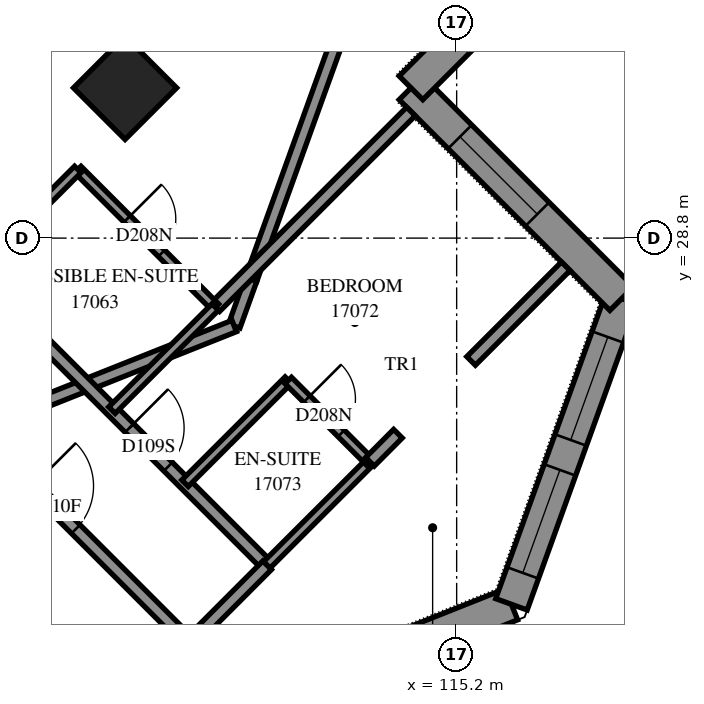
"""IFC4 building model, lengths in metres.
Left out: names, types, materials, properties, quantities, classifications, styles, units other than length and angle.
Written with IfcOpenShell. Run it as: python <this file> out.ifc"""

import sys

from ifc_helpers import new_model, si_unit, direction, frame, frame_2d, origin, origin_2d, place, context, subcontext, project, spatial, polyline, rectangle, outline, extrude, element, fill, save


model = new_model("IFC4")
c1 = context("Model", 3, precision=1e-05, world=origin(), true_north=direction((0.0, 1.0)))
c2 = subcontext(c1, "Body", "Model", "MODEL_VIEW")
j1 = project(units=[si_unit("LENGTHUNIT", "METRE"), si_unit("PLANEANGLEUNIT", "RADIAN")], contexts=[c1])
p1 = place(None, origin())
s1 = spatial("IfcSite", under=j1, at=p1, CompositionType="ELEMENT")
p2 = place(p1, origin())
s2 = spatial("IfcBuilding", under=s1, at=p2, CompositionType="ELEMENT")
p3 = place(p2, frame((0.0, 0.0, 64.4)))
s3 = spatial("IfcBuildingStorey", under=s2, at=p3, CompositionType="ELEMENT", Elevation=64.4)
p4 = place(p3, frame((109.747, 31.271, 0.0), z_axis=(0.0, 0.0, 1.0), x_axis=(0.7071067812, -0.7071067812, 0.0)))
e1 = element("IfcColumn", 1, at=p4, inside=s3, PredefinedType="COLUMN", context=c2, shape_type="SweptSolid", body=[
    extrude(rectangle(XDim=1.2, YDim=1.2, at=origin_2d()), origin(), (0.0, 0.0, 1.0), 3.1),
])
p5 = place(p3, frame((110.939, 20.724, 0.0), z_axis=(0.0, 0.0, 1.0), x_axis=(0.9291504333, 0.3697018694, 0.0)))
e2 = element("IfcWall", 2, at=p5, inside=s3, PredefinedType="SOLIDWALL", context=c2, shape_type="SweptSolid", body=[
    extrude(outline(polyline([(0.118, -0.275), (5.68, -0.275), (5.432, 0.275), (-0.118, 0.275), (0.118, -0.275)])), origin(), (0.0, 0.0, 1.0), 3.1),
])
p6 = place(p5, frame((1.749, 0.0, 0.7)))
e3 = element("IfcOpeningElement", 3, at=p6, cuts=e2, PredefinedType="OPENING", context=c2, shape_type="SweptSolid", body=[
    extrude(rectangle(XDim=1.8, YDim=2.0, at=frame_2d((0.9, 1.0))), frame((0.0, 0.285, 0.0), z_axis=(0.0, -1.0, 0.0), x_axis=(1.0, 0.0, 0.0)), (0.0, 0.0, 1.0), 0.57),
])
p7 = place(p3, frame((116.101, 22.778, 0.0), z_axis=(0.0, 0.0, 1.0), x_axis=(0.339264672, 0.9406909601, 0.0)))
e4 = element("IfcWall", 4, at=p7, inside=s3, PredefinedType="SOLIDWALL", context=c2, shape_type="SweptSolid", body=[
    extrude(outline(polyline([(-0.124, -0.275), (5.519, -0.275), (5.17, 0.275), (0.124, 0.275), (-0.124, -0.275)])), origin(), (0.0, 0.0, 1.0), 3.1),
])
p8 = place(p7, frame((0.549, 0.0, 0.7)))
e5 = element("IfcOpeningElement", 5, at=p8, cuts=e4, PredefinedType="OPENING", context=c2, shape_type="SweptSolid", body=[
    extrude(rectangle(XDim=1.8, YDim=2.0, at=frame_2d((0.9, 1.0))), frame((0.0, 0.285, 0.0), z_axis=(0.0, -1.0, 0.0), x_axis=(1.0, 0.0, 0.0)), (0.0, 0.0, 1.0), 0.57),
])
p9 = place(p7, frame((2.873, 0.0, 0.7)))
e6 = element("IfcOpeningElement", 6, at=p9, cuts=e4, PredefinedType="OPENING", context=c2, shape_type="SweptSolid", body=[
    extrude(rectangle(XDim=1.8, YDim=2.0, at=frame_2d((0.9, 1.0))), frame((0.0, 0.285, 0.0), z_axis=(0.0, -1.0, 0.0), x_axis=(1.0, 0.0, 0.0)), (0.0, 0.0, 1.0), 0.57),
])
p10 = place(p3, frame((117.914, 27.805, 0.0), z_axis=(0.0, 0.0, 1.0), x_axis=(-0.7071067812, 0.7071067812, 0.0)))
e7 = element("IfcWall", 7, at=p10, inside=s3, PredefinedType="SOLIDWALL", context=c2, shape_type="SweptSolid", body=[
    extrude(outline(polyline([(-0.175, -0.275), (4.625, -0.275), (5.175, 0.275), (0.175, 0.275), (-0.175, -0.275)])), origin(), (0.0, 0.0, 1.0), 3.1),
])
p11 = place(p10, frame((1.963, 0.0, 0.7)))
e8 = element("IfcOpeningElement", 8, at=p11, cuts=e7, PredefinedType="OPENING", context=c2, shape_type="SweptSolid", body=[
    extrude(rectangle(XDim=1.8, YDim=1.8, at=frame_2d((0.9, 0.9))), frame((0.0, 0.285, 0.0), z_axis=(0.0, -1.0, 0.0), x_axis=(1.0, 0.0, 0.0)), (0.0, 0.0, 1.0), 0.57),
])
p12 = place(p3, frame((114.449, 31.271, 0.0), z_axis=(0.0, 0.0, 1.0), x_axis=(0.7070983275, 0.7071152348, 0.0)))
e9 = element("IfcWall", 9, at=p12, inside=s3, PredefinedType="SOLIDWALL", context=c2, shape_type="SweptSolid", body=[
    extrude(outline(polyline([(0.275, -0.275), (6.305, -0.275), (5.524, 0.275), (-0.275, 0.275), (0.275, -0.275)])), origin(), (0.0, 0.0, 1.0), 3.1),
])
p13 = place(p12, frame((1.137, 0.0, 0.7)))
e10 = element("IfcOpeningElement", 10, at=p13, cuts=e9, PredefinedType="OPENING", context=c2, shape_type="SweptSolid", body=[
    extrude(rectangle(XDim=1.8, YDim=1.8, at=frame_2d((0.9, 0.9))), frame((0.0, 0.285, 0.0), z_axis=(0.0, -1.0, 0.0), x_axis=(1.0, 0.0, 0.0)), (0.0, 0.0, 1.0), 0.57),
])
p14 = place(p3, frame((113.239, 32.061, 0.0), z_axis=(0.0, 0.0, 1.0), x_axis=(-0.3392575143, -0.9406935415, 0.0)))
e11 = element("IfcWall", 11, at=p14, inside=s3, PredefinedType="PARAPET", context=c2, shape_type="SweptSolid", body=[
    extrude(outline(polyline([(0.0, -0.1), (4.185, -0.1), (4.185, 0.1), (0.0, 0.1), (0.0, -0.1)])), origin(), (0.0, 0.0, 1.0), 0.25),
])
p15 = place(p3, frame((111.819, 28.124, 0.0), z_axis=(0.0, 0.0, 1.0), x_axis=(-0.3392690321, -0.9406893876, 0.0)))
e12 = element("IfcWall", 12, at=p15, inside=s3, PredefinedType="PARAPET", context=c2, shape_type="SweptSolid", body=[
    extrude(outline(polyline([(0.0, -0.1), (0.773, -0.1), (0.863, 0.1), (0.0, 0.1), (0.0, -0.1)])), origin(), (0.0, 0.0, 1.0), 0.25),
])
p16 = place(p3, frame((111.542, 27.354, 0.0), z_axis=(0.0, 0.0, 1.0), x_axis=(-0.9291537819, -0.3696934536, 0.0)))
e13 = element("IfcWall", 13, at=p16, inside=s3, PredefinedType="PARAPET", context=c2, shape_type="SweptSolid", body=[
    extrude(outline(polyline([(0.045, -0.1), (5.612, -0.1), (5.526, 0.1), (-0.045, 0.1), (0.045, -0.1)])), origin(), (0.0, 0.0, 1.0), 0.25),
])
p17 = place(p3, frame((101.825, 31.125, 0.0), z_axis=(0.0, 0.0, 1.0), x_axis=(0.7071067812, -0.7071067812, 0.0)))
e14 = element("IfcWall", 14, at=p17, inside=s3, PredefinedType="PARTITIONING", context=c2, shape_type="SweptSolid", body=[
    extrude(rectangle(XDim=12.7, YDim=0.2, at=frame_2d((6.35, 0.0))), origin(), (0.0, 0.0, 1.0), 3.1),
])
p18 = place(p17, frame((3.895, 0.0, 0.0)))
e15 = element("IfcOpeningElement", 15, at=p18, cuts=e14, PredefinedType="OPENING", context=c2, shape_type="SweptSolid", body=[
    extrude(rectangle(XDim=0.9, YDim=2.1, at=frame_2d((0.45, 1.05))), frame((0.0, 0.11, 0.0), z_axis=(0.0, -1.0, 0.0), x_axis=(1.0, 0.0, 0.0)), (0.0, 0.0, 1.0), 0.22),
])
p19 = place(p17, frame((9.056, 0.0, 0.0)))
e16 = element("IfcOpeningElement", 16, at=p19, cuts=e14, PredefinedType="OPENING", context=c2, shape_type="SweptSolid", body=[
    extrude(rectangle(XDim=1.0, YDim=2.1, at=frame_2d((0.5, 1.05))), frame((0.0, 0.11, 0.0), z_axis=(0.0, -1.0, 0.0), x_axis=(1.0, 0.0, 0.0)), (0.0, 0.0, 1.0), 0.22),
])
p20 = place(p3, frame((106.987, 28.509, 0.0), z_axis=(0.0, 0.0, 1.0), x_axis=(0.7071067812, -0.7071067812, 0.0)))
e17 = element("IfcWall", 17, at=p20, inside=s3, PredefinedType="PARTITIONING", context=c2, shape_type="SweptSolid", body=[
    extrude(rectangle(XDim=7.198, YDim=0.2, at=frame_2d((3.599, 0.0))), origin(), (0.0, 0.0, 1.0), 3.1),
])
p21 = place(p20, frame((4.004, 0.0, 0.0)))
e18 = element("IfcOpeningElement", 18, at=p21, cuts=e17, PredefinedType="OPENING", context=c2, shape_type="SweptSolid", body=[
    extrude(rectangle(XDim=0.9, YDim=2.1, at=frame_2d((0.45, 1.05))), frame((0.0, 0.11, 0.0), z_axis=(0.0, -1.0, 0.0), x_axis=(1.0, 0.0, 0.0)), (0.0, 0.0, 1.0), 0.22),
])
p22 = place(p3, frame((111.231, 27.665, 0.0), z_axis=(0.0, 0.0, 1.0), x_axis=(0.7071067812, 0.7071067812, 0.0)))
e19 = element("IfcWall", 19, at=p22, inside=s3, PredefinedType="PARTITIONING", context=c2, shape_type="SweptSolid", body=[
    extrude(rectangle(XDim=4.55, YDim=0.2, at=frame_2d((2.275, 0.0))), origin(), (0.0, 0.0, 1.0), 3.1),
])
p23 = place(p3, frame((108.97, 29.928, 0.0), z_axis=(0.0, 0.0, 1.0), x_axis=(0.7067942478, -0.7074191764, 0.0)))
e20 = element("IfcWall", 20, at=p23, inside=s3, PredefinedType="PARTITIONING", context=c2, shape_type="SweptSolid", body=[
    extrude(rectangle(XDim=3.2, YDim=0.15, at=frame_2d((1.6, 0.0))), origin(), (0.0, 0.0, 1.0), 3.1),
])
p24 = place(p23, frame((1.148, 0.0, 0.0)))
e21 = element("IfcOpeningElement", 21, at=p24, cuts=e20, PredefinedType="OPENING", context=c2, shape_type="SweptSolid", body=[
    extrude(rectangle(XDim=0.8, YDim=2.1, at=frame_2d((0.4, 1.05))), frame((0.0, 0.085, 0.0), z_axis=(0.0, -1.0, 0.0), x_axis=(1.0, 0.0, 0.0)), (0.0, 0.0, 1.0), 0.17),
])
p25 = place(p3, frame((107.271, 28.231, 0.0), z_axis=(0.0, 0.0, 1.0), x_axis=(0.7071067812, 0.7071067812, 0.0)))
e22 = element("IfcWall", 22, at=p25, inside=s3, PredefinedType="PARTITIONING", context=c2, shape_type="SweptSolid", body=[
    extrude(rectangle(XDim=2.401, YDim=0.15, at=frame_2d((1.201, 0.0))), origin(), (0.0, 0.0, 1.0), 3.1),
])
for number, where, z_axis, x_axis in (
    (23, (112.077, 23.425, 0.0), (0.0, 0.0, 1.0), (0.708, 0.707, 0.0)),
    (24, (109.531, 25.971, 0.0), (0.0, 0.0, 1.0), (0.708, 0.707, 0.0)),
    (25, (110.734, 24.768, 0.0), (0.0, 0.0, 1.0), (0.708, 0.707, 0.0)),
):
    element("IfcWall", number, at=place(p3, frame(where, z_axis=z_axis, x_axis=x_axis)), inside=s3, PredefinedType="PARTITIONING", context=c2, shape_type="SweptSolid", body=[
        extrude(rectangle(XDim=2.4, YDim=0.15, at=frame_2d((1.2, 0.0))), origin(), (0.0, 0.0, 1.0), 3.1),
    ])
p26 = place(p3, frame((115.438, 26.78, 0.0), z_axis=(0.0, 0.0, 1.0), x_axis=(0.7071067812, 0.7071067812, 0.0)))
e26 = element("IfcWall", 26, at=p26, inside=s3, PredefinedType="PARTITIONING", context=c2, shape_type="SweptSolid", body=[
    extrude(rectangle(XDim=2.201, YDim=0.2, at=frame_2d((1.101, 0.0))), origin(), (0.0, 0.0, 1.0), 3.1),
])
p27 = place(p3, frame((112.431, 26.459, 0.0), z_axis=(0.0, 0.0, 1.0), x_axis=(0.7071067812, -0.7071067812, 0.0)))
e27 = element("IfcWall", 27, at=p27, inside=s3, PredefinedType="PARTITIONING", context=c2, shape_type="SweptSolid", body=[
    extrude(rectangle(XDim=1.901, YDim=0.15, at=frame_2d((0.95, 0.0))), origin(), (0.0, 0.0, 1.0), 3.1),
])
p28 = place(p27, frame((0.431, 0.0, 0.0)))
e28 = element("IfcOpeningElement", 28, at=p28, cuts=e27, PredefinedType="OPENING", context=c2, shape_type="SweptSolid", body=[
    extrude(rectangle(XDim=0.8, YDim=2.1, at=frame_2d((0.4, 1.05))), frame((0.0, 0.085, 0.0), z_axis=(0.0, -1.0, 0.0), x_axis=(1.0, 0.0, 0.0)), (0.0, 0.0, 1.0), 0.17),
])
p29 = place(p3, frame((110.811, 22.145, 0.0), z_axis=(0.0, 0.0, 1.0), x_axis=(0.7065510983, 0.7076620277, 0.0)))
e29 = element("IfcWall", 29, at=p29, inside=s3, PredefinedType="PARTITIONING", context=c2, shape_type="SweptSolid", body=[
    extrude(rectangle(XDim=1.8, YDim=0.2, at=frame_2d((0.9, 0.0))), origin(), (0.0, 0.0, 1.0), 3.1),
])
p30 = place(p3, frame((113.775, 25.122, 0.0), z_axis=(0.0, 0.0, 1.0), x_axis=(0.705571267, 0.7086389682, 0.0)))
e30 = element("IfcWall", 30, at=p30, inside=s3, PredefinedType="PARTITIONING", context=c2, shape_type="SweptSolid", body=[
    extrude(rectangle(XDim=0.652, YDim=0.2, at=frame_2d((0.326, 0.0))), origin(), (0.0, 0.0, 1.0), 3.1),
])
p31 = place(p8, origin())
e31 = element("IfcWindow", 31, at=p31, inside=s3, PartitioningType="SINGLE_PANEL", PredefinedType="WINDOW", context=c2, shape_type="SweptSolid", body=[
    extrude(rectangle(XDim=1.8, YDim=2.0, at=frame_2d((0.9, 1.0))), frame((0.0, 0.155, 0.0), z_axis=(0.0, -1.0, 0.0), x_axis=(1.0, 0.0, 0.0)), (0.0, 0.0, 1.0), 0.06),
])
fill(e5, e31)
p32 = place(p9, origin())
e32 = element("IfcWindow", 32, at=p32, inside=s3, PartitioningType="SINGLE_PANEL", PredefinedType="WINDOW", context=c2, shape_type="SweptSolid", body=[
    extrude(rectangle(XDim=1.8, YDim=2.0, at=frame_2d((0.9, 1.0))), frame((0.0, 0.155, 0.0), z_axis=(0.0, -1.0, 0.0), x_axis=(1.0, 0.0, 0.0)), (0.0, 0.0, 1.0), 0.06),
])
fill(e6, e32)
p33 = place(p11, origin())
e33 = element("IfcWindow", 33, at=p33, inside=s3, PartitioningType="SINGLE_PANEL", PredefinedType="WINDOW", context=c2, shape_type="SweptSolid", body=[
    extrude(rectangle(XDim=1.8, YDim=1.8, at=frame_2d((0.9, 0.9))), frame((0.0, 0.155, 0.0), z_axis=(0.0, -1.0, 0.0), x_axis=(1.0, 0.0, 0.0)), (0.0, 0.0, 1.0), 0.06),
])
fill(e8, e33)
p34 = place(p24, origin())
e34 = element("IfcDoor", 34, at=p34, inside=s3, OperationType="SINGLE_SWING_RIGHT", PredefinedType="DOOR", context=c2, shape_type="SweptSolid", body=[
    extrude(rectangle(XDim=0.8, YDim=2.1, at=frame_2d((0.4, 1.05))), frame((0.0, 0.025, 0.0), z_axis=(0.0, -1.0, 0.0), x_axis=(1.0, 0.0, 0.0)), (0.0, 0.0, 1.0), 0.05),
])
fill(e21, e34)
p35 = place(p19, origin())
e35 = element("IfcDoor", 35, at=p35, inside=s3, OperationType="SINGLE_SWING_RIGHT", PredefinedType="DOOR", context=c2, shape_type="SweptSolid", body=[
    extrude(rectangle(XDim=1.0, YDim=2.1, at=frame_2d((0.5, 1.05))), frame((0.0, 0.025, 0.0), z_axis=(0.0, -1.0, 0.0), x_axis=(1.0, 0.0, 0.0)), (0.0, 0.0, 1.0), 0.05),
])
fill(e16, e35)
p36 = place(p21, origin())
e36 = element("IfcDoor", 36, at=p36, inside=s3, OperationType="SINGLE_SWING_RIGHT", PredefinedType="DOOR", context=c2, shape_type="SweptSolid", body=[
    extrude(rectangle(XDim=0.9, YDim=2.1, at=frame_2d((0.45, 1.05))), frame((0.0, 0.025, 0.0), z_axis=(0.0, -1.0, 0.0), x_axis=(1.0, 0.0, 0.0)), (0.0, 0.0, 1.0), 0.05),
])
fill(e18, e36)
p37 = place(p28, origin())
e37 = element("IfcDoor", 37, at=p37, inside=s3, OperationType="SINGLE_SWING_RIGHT", PredefinedType="DOOR", context=c2, shape_type="SweptSolid", body=[
    extrude(rectangle(XDim=0.8, YDim=2.1, at=frame_2d((0.4, 1.05))), frame((0.0, 0.025, 0.0), z_axis=(0.0, -1.0, 0.0), x_axis=(1.0, 0.0, 0.0)), (0.0, 0.0, 1.0), 0.05),
])
fill(e28, e37)
save(model, sys.argv[1])
